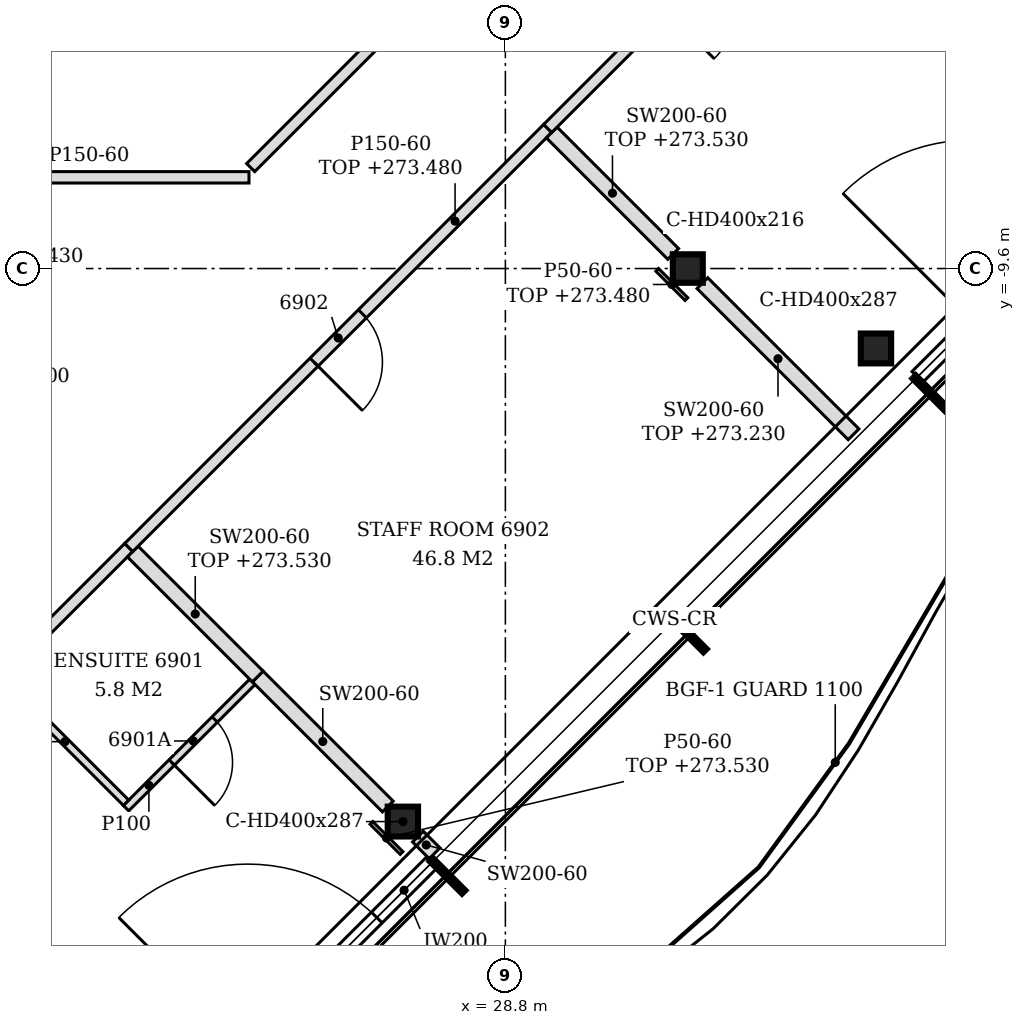
"""IFC4 building model, lengths in metres.
Left out: names, types, materials, properties, quantities, classifications, styles, units other than length and angle.
Written with IfcOpenShell. Run it as: python <this file> out.ifc"""

import sys

from ifc_helpers import new_model, si_unit, direction, frame, frame_2d, origin, origin_2d, place, context, subcontext, project, spatial, rectangle, i_section, extrude, element, fill, save


model = new_model("IFC4")
c1 = context("Model", 3, precision=1e-05, world=origin(), true_north=direction((0.0, 1.0)))
c2 = subcontext(c1, "Body", "Model", "MODEL_VIEW")
j1 = project(units=[si_unit("LENGTHUNIT", "METRE"), si_unit("PLANEANGLEUNIT", "RADIAN")], contexts=[c1])
p1 = place(None, origin())
s1 = spatial("IfcSite", under=j1, at=p1, CompositionType="ELEMENT")
p2 = place(p1, origin())
s2 = spatial("IfcBuilding", under=s1, at=p2, CompositionType="ELEMENT")
p3 = place(p2, frame((0.0, 0.0, 270.6)))
s3 = spatial("IfcBuildingStorey", under=s2, at=p3, CompositionType="ELEMENT", Elevation=270.6)
for number, where, z_axis, x_axis in (
    (1, (27.451, -16.876, -0.15), (0.0, 0.0, 1.0), (1.0, 0.0, 0.0)),
    (2, (33.676, -10.652, -0.15), (0.0, 0.0, 1.0), (1.0, 0.0, 0.0)),
):
    element("IfcColumn", number, at=place(p3, frame(where, z_axis=z_axis, x_axis=x_axis)), inside=s3, PredefinedType="COLUMN", context=c2, shape_type="SweptSolid", body=[
        extrude(i_section(OverallWidth=0.399, OverallDepth=0.393, WebThickness=0.023, FlangeThickness=0.037, FilletRadius=0.015, at=origin_2d()), origin(), (0.0, 0.0, 1.0), 3.6),
    ])
p4 = place(p3, frame((31.2, -9.6, -0.15), z_axis=(0.0, 0.0, 1.0), x_axis=(1.0, 0.0, 0.0)))
e3 = element("IfcColumn", 3, at=p4, inside=s3, PredefinedType="COLUMN", context=c2, shape_type="SweptSolid", body=[
    extrude(i_section(OverallWidth=0.394, OverallDepth=0.375, WebThickness=0.017, FlangeThickness=0.028, FilletRadius=0.015, at=origin_2d()), origin(), (0.0, 0.0, 1.0), 3.6),
])
p5 = place(p3, frame((24.693, -20.553, 0.0), z_axis=(0.0, 0.0, 1.0), x_axis=(0.707079231393, 0.707134329907, 0.0)))
e4 = element("IfcWall", 4, at=p5, inside=s3, PredefinedType="NOTDEFINED", context=c2, shape_type="SweptSolid", body=[
    extrude(rectangle(XDim=4.431, YDim=0.2, at=frame_2d((2.215, 0.0))), origin(), (0.0, 0.0, 1.0), 3.45),
])
p6 = place(p5, frame((1.015, 0.0, 0.0)))
e5 = element("IfcOpeningElement", 5, at=p6, cuts=e4, PredefinedType="OPENING", context=c2, shape_type="SweptSolid", body=[
    extrude(rectangle(XDim=2.4, YDim=2.4, at=frame_2d((1.2, 1.2))), frame((0.0, 0.11, 0.0), z_axis=(0.0, -1.0, 0.0), x_axis=(1.0, 0.0, 0.0)), (0.0, 0.0, 1.0), 0.22),
])
p7 = place(p3, frame((34.22, -11.026, 0.0), z_axis=(0.0, 0.0, 1.0), x_axis=(0.707134329907, 0.707079231393, 0.0)))
e6 = element("IfcWall", 6, at=p7, inside=s3, PredefinedType="NOTDEFINED", context=c2, shape_type="SweptSolid", body=[
    extrude(rectangle(XDim=4.431, YDim=0.2, at=frame_2d((2.215, 0.0))), origin(), (0.0, 0.0, 1.0), 3.45),
])
p8 = place(p7, frame((1.015, 0.0, 0.0)))
e7 = element("IfcOpeningElement", 7, at=p8, cuts=e6, PredefinedType="OPENING", context=c2, shape_type="SweptSolid", body=[
    extrude(rectangle(XDim=2.4, YDim=2.4, at=frame_2d((1.2, 1.2))), frame((0.0, 0.11, 0.0), z_axis=(0.0, -1.0, 0.0), x_axis=(1.0, 0.0, 0.0)), (0.0, 0.0, 1.0), 0.22),
])
p9 = place(p3, frame((19.243, -17.872, 0.0), z_axis=(0.0, 0.0, 1.0), x_axis=(0.707106781187, 0.707106781187, 0.0)))
e8 = element("IfcWall", 8, at=p9, inside=s3, PredefinedType="PARTITIONING", context=c2, shape_type="SweptSolid", body=[
    extrude(rectangle(XDim=6.508, YDim=0.15, at=frame_2d((3.254, 0.0))), origin(), (0.0, 0.0, 1.0), 2.73),
])
p10 = place(p9, frame((1.513, 0.0, 0.0)))
e9 = element("IfcOpeningElement", 9, at=p10, cuts=e8, PredefinedType="OPENING", context=c2, shape_type="SweptSolid", body=[
    extrude(rectangle(XDim=0.9, YDim=2.1, at=frame_2d((0.45, 1.05))), frame((0.0, 0.085, 0.0), z_axis=(0.0, -1.0, 0.0), x_axis=(1.0, 0.0, 0.0)), (0.0, 0.0, 1.0), 0.17),
])
p11 = place(p3, frame((27.869, -17.293, 0.0), z_axis=(0.0, 0.0, 1.0), x_axis=(-0.707893766299, 0.706318919211, 0.0)))
e10 = element("IfcWall", 10, at=p11, inside=s3, PredefinedType="PARTITIONING", context=c2, shape_type="SweptSolid", body=[
    extrude(rectangle(XDim=0.31, YDim=0.2, at=frame_2d((0.155, 0.0))), origin(), (0.0, 0.0, 1.0), 3.45),
])
p12 = place(p3, frame((23.81, -16.699, 0.0), z_axis=(0.0, 0.0, 1.0), x_axis=(0.707054835785, 0.707158722772, 0.0)))
e11 = element("IfcWall", 11, at=p12, inside=s3, PredefinedType="PARTITIONING", context=c2, shape_type="SweptSolid", body=[
    extrude(rectangle(XDim=2.35, YDim=0.1, at=frame_2d((1.175, 0.0))), origin(), (0.0, 0.0, 1.0), 3.45),
])
p13 = place(p12, frame((0.85, 0.0, 0.0)))
e12 = element("IfcOpeningElement", 12, at=p13, cuts=e11, PredefinedType="OPENING", context=c2, shape_type="SweptSolid", body=[
    extrude(rectangle(XDim=0.8, YDim=2.1, at=frame_2d((0.4, 1.05))), frame((0.0, 0.06, 0.0), z_axis=(0.0, -1.0, 0.0), x_axis=(1.0, 0.0, 0.0)), (0.0, 0.0, 1.0), 0.12),
])
p14 = place(p3, frame((27.253, -16.678, 0.0), z_axis=(0.0, 0.0, 1.0), x_axis=(-0.707258104101, 0.706955425882, 0.0)))
e13 = element("IfcWall", 13, at=p14, inside=s3, PredefinedType="PARTITIONING", context=c2, shape_type="SweptSolid", body=[
    extrude(rectangle(XDim=2.42, YDim=0.2, at=frame_2d((1.21, 0.0))), origin(), (0.0, 0.0, 1.0), 3.45),
])
p15 = place(p3, frame((23.81, -16.629, 0.0), z_axis=(0.0, 0.0, 1.0), x_axis=(-0.707106781187, 0.707106781187, 0.0)))
e14 = element("IfcWall", 14, at=p15, inside=s3, PredefinedType="PARTITIONING", context=c2, shape_type="SweptSolid", body=[
    extrude(rectangle(XDim=2.275, YDim=0.1, at=frame_2d((1.137, 0.0))), origin(), (0.0, 0.0, 1.0), 3.45),
])
p16 = place(p3, frame((25.542, -14.967, 0.0), z_axis=(0.0, 0.0, 1.0), x_axis=(-0.707106781187, 0.707106781187, 0.0)))
e15 = element("IfcWall", 15, at=p16, inside=s3, PredefinedType="PARTITIONING", context=c2, shape_type="SweptSolid", body=[
    extrude(rectangle(XDim=2.325, YDim=0.2, at=frame_2d((1.163, 0.0))), origin(), (0.0, 0.0, 1.0), 2.93),
])
p17 = place(p3, frame((23.845, -13.27, 0.0), z_axis=(0.0, 0.0, 1.0), x_axis=(0.707044144392, 0.707169412433, 0.0)))
e16 = element("IfcWall", 16, at=p17, inside=s3, PredefinedType="PARTITIONING", context=c2, shape_type="SweptSolid", body=[
    extrude(rectangle(XDim=7.796, YDim=0.15, at=frame_2d((3.898, 0.0))), origin(), (0.0, 0.0, 1.0), 2.88),
])
p18 = place(p17, frame((3.448, 0.0, 0.0)))
e17 = element("IfcOpeningElement", 17, at=p18, cuts=e16, PredefinedType="OPENING", context=c2, shape_type="SweptSolid", body=[
    extrude(rectangle(XDim=0.9, YDim=2.1, at=frame_2d((0.45, 1.05))), frame((0.0, 0.085, 0.0), z_axis=(0.0, -1.0, 0.0), x_axis=(1.0, 0.0, 0.0)), (0.0, 0.0, 1.0), 0.17),
])
p19 = place(p3, frame((33.381, -11.781, 0.0), z_axis=(0.0, 0.0, 1.0), x_axis=(-0.707106781187, 0.707106781187, 0.0)))
e18 = element("IfcWall", 18, at=p19, inside=s3, PredefinedType="PARTITIONING", context=c2, shape_type="SweptSolid", body=[
    extrude(rectangle(XDim=2.812, YDim=0.2, at=frame_2d((1.406, 0.0))), origin(), (0.0, 0.0, 1.0), 2.63),
])
p20 = place(p3, frame((31.008, -9.408, 0.0), z_axis=(0.0, 0.0, 1.0), x_axis=(-0.707160802102, 0.707052756143, 0.0)))
e19 = element("IfcWall", 19, at=p20, inside=s3, PredefinedType="PARTITIONING", context=c2, shape_type="SweptSolid", body=[
    extrude(rectangle(XDim=2.26, YDim=0.2, at=frame_2d((1.13, 0.0))), origin(), (0.0, 0.0, 1.0), 2.93),
])
p21 = place(p3, frame((21.215, -8.4, 0.0), z_axis=(0.0, 0.0, 1.0), x_axis=(1.0, 0.0, 0.0)))
e20 = element("IfcWall", 20, at=p21, inside=s3, PredefinedType="PARTITIONING", context=c2, shape_type="SweptSolid", body=[
    extrude(rectangle(XDim=4.212, YDim=0.15, at=frame_2d((2.106, 0.0))), origin(), (0.0, 0.0, 1.0), 3.45),
])
p22 = place(p3, frame((25.449, -8.272, 0.0), z_axis=(0.0, 0.0, 1.0), x_axis=(0.707106781187, 0.707106781187, 0.0)))
e21 = element("IfcWall", 21, at=p22, inside=s3, PredefinedType="PARTITIONING", context=c2, shape_type="SweptSolid", body=[
    extrude(rectangle(XDim=6.426, YDim=0.15, at=frame_2d((3.213, 0.0))), origin(), (0.0, 0.0, 1.0), 2.88),
])
p23 = place(p3, frame((29.357, -7.757, 0.0), z_axis=(0.0, 0.0, 1.0), x_axis=(0.707198954395, 0.707014595961, 0.0)))
e22 = element("IfcWall", 22, at=p23, inside=s3, PredefinedType="PARTITIONING", context=c2, shape_type="SweptSolid", body=[
    extrude(rectangle(XDim=5.297, YDim=0.15, at=frame_2d((2.648, 0.0))), origin(), (0.0, 0.0, 1.0), 2.93),
])
p24 = place(p23, frame((2.198, 0.0, 0.0)))
e23 = element("IfcOpeningElement", 23, at=p24, cuts=e22, PredefinedType="OPENING", context=c2, shape_type="SweptSolid", body=[
    extrude(rectangle(XDim=0.9, YDim=2.1, at=frame_2d((0.45, 1.05))), frame((0.0, 0.085, 0.0), z_axis=(0.0, -1.0, 0.0), x_axis=(1.0, 0.0, 0.0)), (0.0, 0.0, 1.0), 0.17),
])
p25 = place(p3, frame((27.434, -17.289, 0.0), z_axis=(0.0, 0.0, 1.0), x_axis=(-0.707324788503, 0.706888706636, 0.0)))
e24 = element("IfcWall", 24, at=p25, inside=s3, PredefinedType="PARTITIONING", context=c2, shape_type="SweptSolid", body=[
    extrude(rectangle(XDim=0.56, YDim=0.05, at=frame_2d((0.28, 0.0))), origin(), (0.0, 0.0, 1.0), 2.93),
])
p26 = place(p3, frame((31.182, -10.002, 0.0), z_axis=(0.0, 0.0, 1.0), x_axis=(-0.707106781187, 0.707106781187, 0.0)))
e25 = element("IfcWall", 25, at=p26, inside=s3, PredefinedType="PARTITIONING", context=c2, shape_type="SweptSolid", body=[
    extrude(rectangle(XDim=0.544, YDim=0.05, at=frame_2d((0.272, 0.0))), origin(), (0.0, 0.0, 1.0), 2.88),
])
p27 = place(p6, origin())
e26 = element("IfcDoor", 26, at=p27, inside=s3, OperationType="SINGLE_SWING_LEFT", PredefinedType="DOOR", context=c2, shape_type="SweptSolid", body=[
    extrude(rectangle(XDim=2.4, YDim=2.4, at=frame_2d((1.2, 1.2))), frame((0.0, 0.025, 0.0), z_axis=(0.0, -1.0, 0.0), x_axis=(1.0, 0.0, 0.0)), (0.0, 0.0, 1.0), 0.05),
])
fill(e5, e26)
p28 = place(p13, frame((0.8, 0.0, 0.0), z_axis=(0.0, 0.0, 1.0), x_axis=(-1.0, 0.0, 0.0)))
e27 = element("IfcDoor", 27, at=p28, inside=s3, OperationType="SINGLE_SWING_RIGHT", PredefinedType="DOOR", context=c2, shape_type="SweptSolid", body=[
    extrude(rectangle(XDim=0.8, YDim=2.1, at=frame_2d((0.4, 1.05))), frame((0.0, 0.025, 0.0), z_axis=(0.0, -1.0, 0.0), x_axis=(1.0, 0.0, 0.0)), (0.0, 0.0, 1.0), 0.05),
])
fill(e12, e27)
p29 = place(p18, frame((0.9, 0.0, 0.0), z_axis=(0.0, 0.0, 1.0), x_axis=(-1.0, 0.0, 0.0)))
e28 = element("IfcDoor", 28, at=p29, inside=s3, OperationType="SINGLE_SWING_RIGHT", PredefinedType="DOOR", context=c2, shape_type="SweptSolid", body=[
    extrude(rectangle(XDim=0.9, YDim=2.1, at=frame_2d((0.45, 1.05))), frame((0.0, 0.025, 0.0), z_axis=(0.0, -1.0, 0.0), x_axis=(1.0, 0.0, 0.0)), (0.0, 0.0, 1.0), 0.05),
])
fill(e17, e28)
save(model, sys.argv[1])
